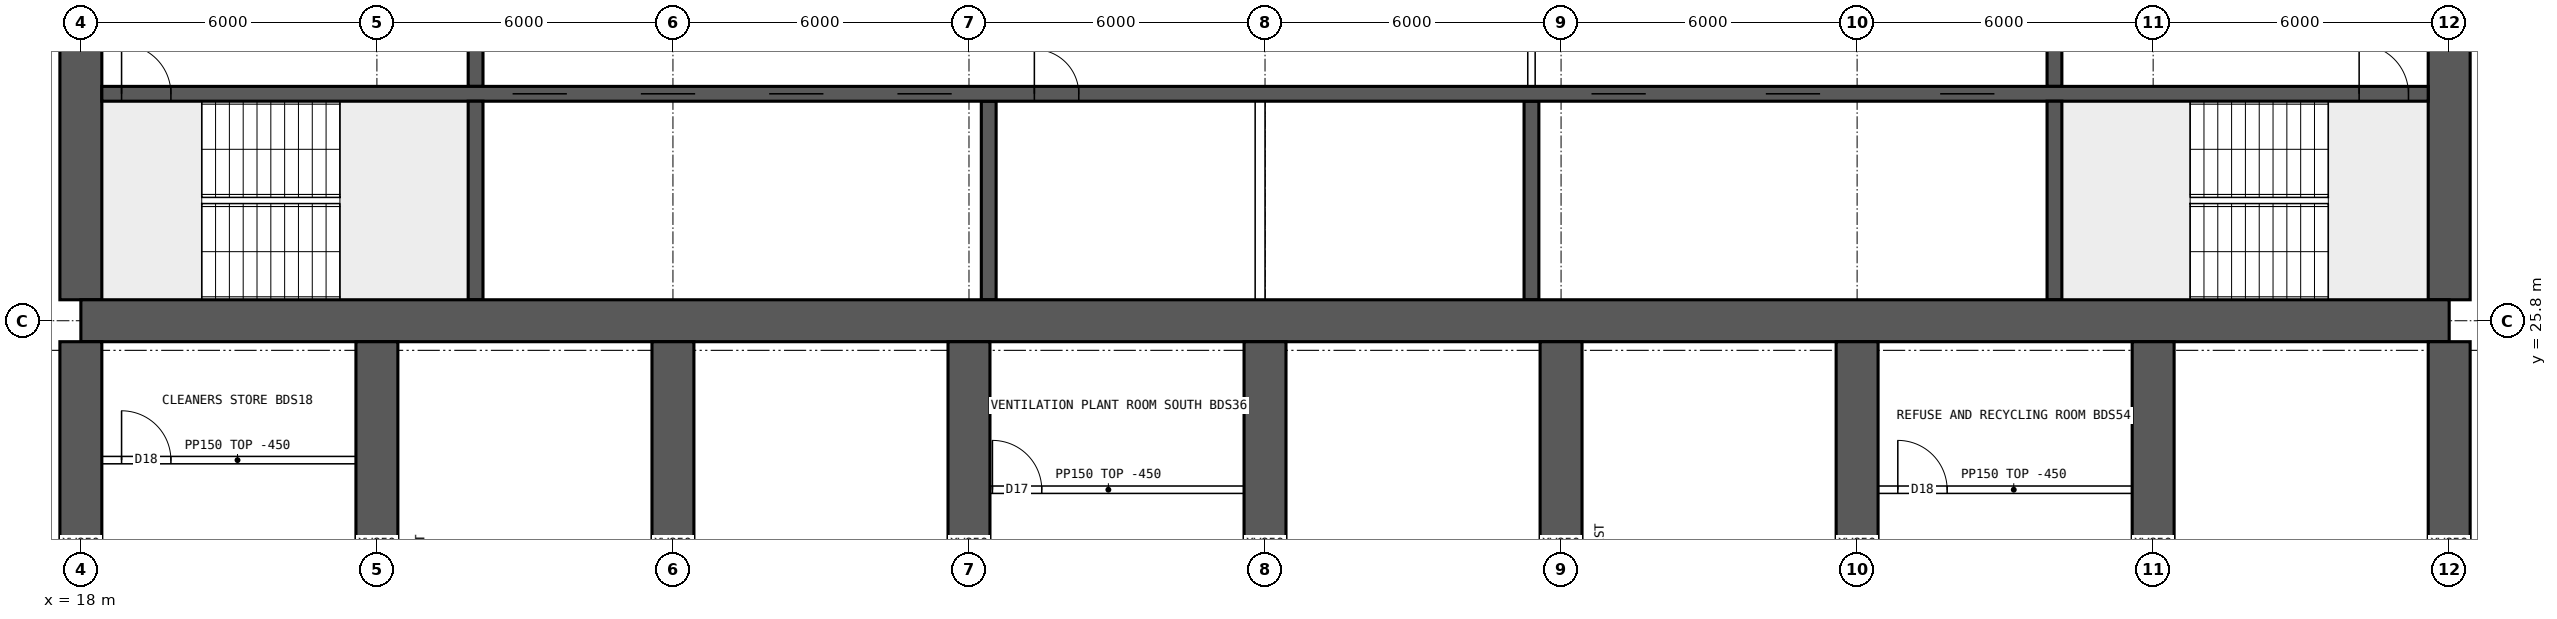
"""IFC4 building model, lengths in metres.
Left out: names, types, materials, properties, quantities, classifications, styles, units other than length and angle.
Written with IfcOpenShell. Run it as: python <this file> out.ifc"""

import sys

from ifc_helpers import new_model, si_unit, direction, frame, frame_2d, origin, place, context, subcontext, project, spatial, rectangle, extrude, element, fill, save


model = new_model("IFC4")
c1 = context("Model", 3, precision=1e-05, world=origin(), true_north=direction((0.0, 1.0)))
c2 = subcontext(c1, "Body", "Model", "MODEL_VIEW")
j1 = project(units=[si_unit("LENGTHUNIT", "METRE"), si_unit("PLANEANGLEUNIT", "RADIAN")], contexts=[c1])
p1 = place(None, origin())
s1 = spatial("IfcSite", under=j1, at=p1, CompositionType="ELEMENT")
p2 = place(p1, origin())
s2 = spatial("IfcBuilding", under=s1, at=p2, CompositionType="ELEMENT")
p3 = place(p2, frame((0.0, 0.0, 174.85)))
s3 = spatial("IfcBuildingStorey", under=s2, at=p3, CompositionType="ELEMENT", Elevation=174.85)
p4 = place(p3, frame((18.0, 25.8, 0.0), z_axis=(0.0, 0.0, 1.0), x_axis=(1.0, 0.0, 0.0)))
e1 = element("IfcWall", 1, at=p4, inside=s3, PredefinedType="SHEAR", context=c2, shape_type="SweptSolid", body=[
    extrude(rectangle(XDim=48.0, YDim=0.85, at=frame_2d((24.0, 0.0))), origin(), (0.0, 0.0, 1.0), 3.75),
])
p5 = place(p3, frame((18.0, 26.225, 0.0), z_axis=(0.0, 0.0, 1.0), x_axis=(0.0, 1.0, 0.0)))
e2 = element("IfcWall", 2, at=p5, inside=s3, PredefinedType="SHEAR", context=c2, shape_type="SweptSolid", body=[
    extrude(rectangle(XDim=11.55, YDim=0.85, at=frame_2d((5.775, 0.0))), origin(), (0.0, 0.0, 1.0), 3.75),
])
p6 = place(p5, frame((5.075, 0.0, 0.0)))
e3 = element("IfcOpeningElement", 3, at=p6, cuts=e2, PredefinedType="OPENING", context=c2, shape_type="SweptSolid", body=[
    extrude(rectangle(XDim=1.2, YDim=2.1, at=frame_2d((0.6, 1.05))), frame((0.0, 0.435, 0.0), z_axis=(0.0, -1.0, 0.0), x_axis=(1.0, 0.0, 0.0)), (0.0, 0.0, 1.0), 0.87),
])
p7 = place(p3, frame((66.0, 26.225, 0.0), z_axis=(0.0, 0.0, 1.0), x_axis=(0.0, 1.0, 0.0)))
e4 = element("IfcWall", 4, at=p7, inside=s3, PredefinedType="SHEAR", context=c2, shape_type="SweptSolid", body=[
    extrude(rectangle(XDim=11.55, YDim=0.85, at=frame_2d((5.775, 0.0))), origin(), (0.0, 0.0, 1.0), 3.75),
])
p8 = place(p7, frame((5.075, 0.0, 0.0)))
e5 = element("IfcOpeningElement", 5, at=p8, cuts=e4, PredefinedType="OPENING", context=c2, shape_type="SweptSolid", body=[
    extrude(rectangle(XDim=1.2, YDim=2.1, at=frame_2d((0.6, 1.05))), frame((0.0, 0.435, 0.0), z_axis=(0.0, -1.0, 0.0), x_axis=(1.0, 0.0, 0.0)), (0.0, 0.0, 1.0), 0.87),
])
p9 = place(p3, frame((18.425, 30.4, 0.0), z_axis=(0.0, 0.0, 1.0), x_axis=(1.0, 0.0, 0.0)))
e6 = element("IfcWall", 6, at=p9, inside=s3, PredefinedType="SHEAR", context=c2, shape_type="SweptSolid", body=[
    extrude(rectangle(XDim=47.15, YDim=0.3, at=frame_2d((23.575, 0.0))), origin(), (0.0, 0.0, 1.0), 3.75),
])
p10 = place(p9, frame((0.4, 0.0, 0.0)))
e7 = element("IfcOpeningElement", 7, at=p10, cuts=e6, PredefinedType="OPENING", context=c2, shape_type="SweptSolid", body=[
    extrude(rectangle(XDim=1.0, YDim=2.1, at=frame_2d((0.5, 1.05))), frame((0.0, 0.16, 0.0), z_axis=(0.0, -1.0, 0.0), x_axis=(1.0, 0.0, 0.0)), (0.0, 0.0, 1.0), 0.32),
])
p11 = place(p9, frame((45.75, 0.0, 0.0)))
e8 = element("IfcOpeningElement", 8, at=p11, cuts=e6, PredefinedType="OPENING", context=c2, shape_type="SweptSolid", body=[
    extrude(rectangle(XDim=1.0, YDim=2.1, at=frame_2d((0.5, 1.05))), frame((0.0, 0.16, 0.0), z_axis=(0.0, -1.0, 0.0), x_axis=(1.0, 0.0, 0.0)), (0.0, 0.0, 1.0), 0.32),
])
p12 = place(p9, frame((8.325, 0.0, 0.0)))
e9 = element("IfcOpeningElement", 9, at=p12, cuts=e6, PredefinedType="OPENING", context=c2, shape_type="SweptSolid", body=[
    extrude(rectangle(XDim=1.1, YDim=2.1, at=frame_2d((0.55, 1.05))), frame((0.0, 0.16, 0.0), z_axis=(0.0, -1.0, 0.0), x_axis=(1.0, 0.0, 0.0)), (0.0, 0.0, 1.0), 0.32),
])
p13 = place(p9, frame((10.925, 0.0, 0.0)))
e10 = element("IfcOpeningElement", 10, at=p13, cuts=e6, PredefinedType="OPENING", context=c2, shape_type="SweptSolid", body=[
    extrude(rectangle(XDim=1.1, YDim=2.1, at=frame_2d((0.55, 1.05))), frame((0.0, 0.16, 0.0), z_axis=(0.0, -1.0, 0.0), x_axis=(1.0, 0.0, 0.0)), (0.0, 0.0, 1.0), 0.32),
])
p14 = place(p9, frame((13.525, 0.0, 0.0)))
e11 = element("IfcOpeningElement", 11, at=p14, cuts=e6, PredefinedType="OPENING", context=c2, shape_type="SweptSolid", body=[
    extrude(rectangle(XDim=1.1, YDim=2.1, at=frame_2d((0.55, 1.05))), frame((0.0, 0.16, 0.0), z_axis=(0.0, -1.0, 0.0), x_axis=(1.0, 0.0, 0.0)), (0.0, 0.0, 1.0), 0.32),
])
p15 = place(p9, frame((16.125, 0.0, 0.0)))
e12 = element("IfcOpeningElement", 12, at=p15, cuts=e6, PredefinedType="OPENING", context=c2, shape_type="SweptSolid", body=[
    extrude(rectangle(XDim=1.1, YDim=2.1, at=frame_2d((0.55, 1.05))), frame((0.0, 0.16, 0.0), z_axis=(0.0, -1.0, 0.0), x_axis=(1.0, 0.0, 0.0)), (0.0, 0.0, 1.0), 0.32),
])
p16 = place(p9, frame((18.9, 0.0, 0.0)))
e13 = element("IfcOpeningElement", 13, at=p16, cuts=e6, PredefinedType="OPENING", context=c2, shape_type="SweptSolid", body=[
    extrude(rectangle(XDim=0.9, YDim=2.1, at=frame_2d((0.45, 1.05))), frame((0.0, 0.16, 0.0), z_axis=(0.0, -1.0, 0.0), x_axis=(1.0, 0.0, 0.0)), (0.0, 0.0, 1.0), 0.32),
])
p17 = place(p9, frame((30.192, 0.0, 0.0)))
e14 = element("IfcOpeningElement", 14, at=p17, cuts=e6, PredefinedType="OPENING", context=c2, shape_type="SweptSolid", body=[
    extrude(rectangle(XDim=1.1, YDim=2.1, at=frame_2d((0.55, 1.05))), frame((0.0, 0.16, 0.0), z_axis=(0.0, -1.0, 0.0), x_axis=(1.0, 0.0, 0.0)), (0.0, 0.0, 1.0), 0.32),
])
p18 = place(p9, frame((33.725, 0.0, 0.0)))
e15 = element("IfcOpeningElement", 15, at=p18, cuts=e6, PredefinedType="OPENING", context=c2, shape_type="SweptSolid", body=[
    extrude(rectangle(XDim=1.1, YDim=2.1, at=frame_2d((0.55, 1.05))), frame((0.0, 0.16, 0.0), z_axis=(0.0, -1.0, 0.0), x_axis=(1.0, 0.0, 0.0)), (0.0, 0.0, 1.0), 0.32),
])
p19 = place(p9, frame((37.258, 0.0, 0.0)))
e16 = element("IfcOpeningElement", 16, at=p19, cuts=e6, PredefinedType="OPENING", context=c2, shape_type="SweptSolid", body=[
    extrude(rectangle(XDim=1.1, YDim=2.1, at=frame_2d((0.55, 1.05))), frame((0.0, 0.16, 0.0), z_axis=(0.0, -1.0, 0.0), x_axis=(1.0, 0.0, 0.0)), (0.0, 0.0, 1.0), 0.32),
])
for number, where, z_axis, x_axis in (
    (17, (26.0, 26.225, 0.0), (0.0, 0.0, 1.0), (0.0, 1.0, 0.0)),
    (18, (58.0, 26.225, 0.0), (0.0, 0.0, 1.0), (0.0, 1.0, 0.0)),
):
    element("IfcWall", number, at=place(p3, frame(where, z_axis=z_axis, x_axis=x_axis)), inside=s3, PredefinedType="SHEAR", context=c2, shape_type="SweptSolid", body=[
        extrude(rectangle(XDim=4.025, YDim=0.3, at=frame_2d((2.012, 0.0))), origin(), (0.0, 0.0, 1.0), 3.75),
    ])
p20 = place(p3, frame((26.0, 30.55, 0.0), z_axis=(0.0, 0.0, 1.0), x_axis=(0.0, 1.0, 0.0)))
e19 = element("IfcWall", 19, at=p20, inside=s3, PredefinedType="SHEAR", context=c2, shape_type="SweptSolid", body=[
    extrude(rectangle(XDim=3.9, YDim=0.3, at=frame_2d((1.95, 0.0))), origin(), (0.0, 0.0, 1.0), 3.75),
])
p21 = place(p20, frame((1.4, 0.0, 0.0)))
e20 = element("IfcOpeningElement", 20, at=p21, cuts=e19, PredefinedType="OPENING", context=c2, shape_type="SweptSolid", body=[
    extrude(rectangle(XDim=1.2, YDim=2.1, at=frame_2d((0.6, 1.05))), frame((0.0, 0.16, 0.0), z_axis=(0.0, -1.0, 0.0), x_axis=(1.0, 0.0, 0.0)), (0.0, 0.0, 1.0), 0.32),
])
p22 = place(p3, frame((58.0, 30.55, 0.0), z_axis=(0.0, 0.0, 1.0), x_axis=(0.0, 1.0, 0.0)))
e21 = element("IfcWall", 21, at=p22, inside=s3, PredefinedType="SHEAR", context=c2, shape_type="SweptSolid", body=[
    extrude(rectangle(XDim=3.9, YDim=0.3, at=frame_2d((1.95, 0.0))), origin(), (0.0, 0.0, 1.0), 3.75),
])
p23 = place(p22, frame((1.4, 0.0, 0.0)))
e22 = element("IfcOpeningElement", 22, at=p23, cuts=e21, PredefinedType="OPENING", context=c2, shape_type="SweptSolid", body=[
    extrude(rectangle(XDim=1.2, YDim=2.1, at=frame_2d((0.6, 1.05))), frame((0.0, 0.16, 0.0), z_axis=(0.0, -1.0, 0.0), x_axis=(1.0, 0.0, 0.0)), (0.0, 0.0, 1.0), 0.32),
])
for number, where, z_axis, x_axis in (
    (23, (36.4, 26.225, 0.0), (0.0, 0.0, 1.0), (0.0, 1.0, 0.0)),
    (24, (47.4, 26.225, 0.0), (0.0, 0.0, 1.0), (0.0, 1.0, 0.0)),
):
    element("IfcWall", number, at=place(p3, frame(where, z_axis=z_axis, x_axis=x_axis)), inside=s3, PredefinedType="SHEAR", context=c2, shape_type="SweptSolid", body=[
        extrude(rectangle(XDim=4.025, YDim=0.3, at=frame_2d((2.012, 0.0))), origin(), (0.0, 0.0, 1.0), 3.75),
    ])
for number, where, z_axis, x_axis in (
    (25, (18.0, 17.2, 0.0), (0.0, 0.0, 1.0), (0.0, 1.0, 0.0)),
    (26, (24.0, 17.2, 0.0), (0.0, 0.0, 1.0), (0.0, 1.0, 0.0)),
    (27, (30.0, 17.2, 0.0), (0.0, 0.0, 1.0), (0.0, 1.0, 0.0)),
    (28, (36.0, 17.2, 0.0), (0.0, 0.0, 1.0), (0.0, 1.0, 0.0)),
    (29, (42.0, 17.2, 0.0), (0.0, 0.0, 1.0), (0.0, 1.0, 0.0)),
    (30, (48.0, 17.2, 0.0), (0.0, 0.0, 1.0), (0.0, 1.0, 0.0)),
    (31, (54.0, 17.2, 0.0), (0.0, 0.0, 1.0), (0.0, 1.0, 0.0)),
    (32, (60.0, 17.2, 0.0), (0.0, 0.0, 1.0), (0.0, 1.0, 0.0)),
    (33, (66.0, 17.2, 0.0), (0.0, 0.0, 1.0), (0.0, 1.0, 0.0)),
):
    element("IfcWall", number, at=place(p3, frame(where, z_axis=z_axis, x_axis=x_axis)), inside=s3, PredefinedType="SHEAR", context=c2, shape_type="SweptSolid", body=[
        extrude(rectangle(XDim=8.175, YDim=0.85, at=frame_2d((4.087, 0.0))), origin(), (0.0, 0.0, 1.0), 3.75),
    ])
p24 = place(p3, frame((47.4, 30.55, 0.0), z_axis=(0.0, 0.0, 1.0), x_axis=(0.0, 1.0, 0.0)))
e34 = element("IfcWall", 34, at=p24, inside=s3, PredefinedType="SOLIDWALL", context=c2, shape_type="SweptSolid", body=[
    extrude(rectangle(XDim=3.9, YDim=0.15, at=frame_2d((1.95, 0.0))), origin(), (0.0, 0.0, 1.0), 3.3),
])
p25 = place(p24, frame((1.15, 0.0, 0.0)))
e35 = element("IfcOpeningElement", 35, at=p25, cuts=e34, PredefinedType="OPENING", context=c2, shape_type="SweptSolid", body=[
    extrude(rectangle(XDim=1.6, YDim=2.1, at=frame_2d((0.8, 1.05))), frame((0.0, 0.085, 0.0), z_axis=(0.0, -1.0, 0.0), x_axis=(1.0, 0.0, 0.0)), (0.0, 0.0, 1.0), 0.17),
])
p26 = place(p3, frame((41.9, 26.225, 0.0), z_axis=(0.0, 0.0, 1.0), x_axis=(0.0, 1.0, 0.0)))
e36 = element("IfcWall", 36, at=p26, inside=s3, PredefinedType="SOLIDWALL", context=c2, shape_type="SweptSolid", body=[
    extrude(rectangle(XDim=4.025, YDim=0.2, at=frame_2d((2.012, 0.0))), origin(), (0.0, 0.0, 1.0), 3.3),
])
p27 = place(p3, frame((18.425, 22.975, 0.0), z_axis=(0.0, 0.0, 1.0), x_axis=(1.0, 0.0, 0.0)))
e37 = element("IfcWall", 37, at=p27, inside=s3, PredefinedType="PARTITIONING", context=c2, shape_type="SweptSolid", body=[
    extrude(rectangle(XDim=5.5, YDim=0.15, at=frame_2d((2.75, 0.0))), origin(), (0.0, 0.0, 1.0), 3.3),
])
p28 = place(p27, frame((0.4, 0.0, 0.0)))
e38 = element("IfcOpeningElement", 38, at=p28, cuts=e37, PredefinedType="OPENING", context=c2, shape_type="SweptSolid", body=[
    extrude(rectangle(XDim=1.0, YDim=2.1, at=frame_2d((0.5, 1.05))), frame((0.0, 0.085, 0.0), z_axis=(0.0, -1.0, 0.0), x_axis=(1.0, 0.0, 0.0)), (0.0, 0.0, 1.0), 0.17),
])
p29 = place(p3, frame((36.075, 22.375, 0.0), z_axis=(0.0, 0.0, 1.0), x_axis=(1.0, 0.0, 0.0)))
e39 = element("IfcWall", 39, at=p29, inside=s3, PredefinedType="PARTITIONING", context=c2, shape_type="SweptSolid", body=[
    extrude(rectangle(XDim=5.5, YDim=0.15, at=frame_2d((2.75, 0.0))), origin(), (0.0, 0.0, 1.0), 3.3),
])
p30 = place(p29, frame((0.4, 0.0, 0.0)))
e40 = element("IfcOpeningElement", 40, at=p30, cuts=e39, PredefinedType="OPENING", context=c2, shape_type="SweptSolid", body=[
    extrude(rectangle(XDim=1.0, YDim=2.1, at=frame_2d((0.5, 1.05))), frame((0.0, 0.085, 0.0), z_axis=(0.0, -1.0, 0.0), x_axis=(1.0, 0.0, 0.0)), (0.0, 0.0, 1.0), 0.17),
])
p31 = place(p3, frame((54.425, 22.375, 0.0), z_axis=(0.0, 0.0, 1.0), x_axis=(1.0, 0.0, 0.0)))
e41 = element("IfcWall", 41, at=p31, inside=s3, PredefinedType="PARTITIONING", context=c2, shape_type="SweptSolid", body=[
    extrude(rectangle(XDim=5.5, YDim=0.15, at=frame_2d((2.75, 0.0))), origin(), (0.0, 0.0, 1.0), 3.3),
])
p32 = place(p31, frame((0.4, 0.0, 0.0)))
e42 = element("IfcOpeningElement", 42, at=p32, cuts=e41, PredefinedType="OPENING", context=c2, shape_type="SweptSolid", body=[
    extrude(rectangle(XDim=1.0, YDim=2.1, at=frame_2d((0.5, 1.05))), frame((0.0, 0.085, 0.0), z_axis=(0.0, -1.0, 0.0), x_axis=(1.0, 0.0, 0.0)), (0.0, 0.0, 1.0), 0.17),
])
p33 = place(p10, origin())
e43 = element("IfcDoor", 43, at=p33, inside=s3, OperationType="SINGLE_SWING_LEFT", PredefinedType="DOOR", context=c2, shape_type="SweptSolid", body=[
    extrude(rectangle(XDim=1.0, YDim=2.1, at=frame_2d((0.5, 1.05))), frame((0.0, 0.025, 0.0), z_axis=(0.0, -1.0, 0.0), x_axis=(1.0, 0.0, 0.0)), (0.0, 0.0, 1.0), 0.05),
])
fill(e7, e43)
p34 = place(p11, origin())
e44 = element("IfcDoor", 44, at=p34, inside=s3, OperationType="SINGLE_SWING_LEFT", PredefinedType="DOOR", context=c2, shape_type="SweptSolid", body=[
    extrude(rectangle(XDim=1.0, YDim=2.1, at=frame_2d((0.5, 1.05))), frame((0.0, 0.025, 0.0), z_axis=(0.0, -1.0, 0.0), x_axis=(1.0, 0.0, 0.0)), (0.0, 0.0, 1.0), 0.05),
])
fill(e8, e44)
p35 = place(p12, origin())
e45 = element("IfcDoor", 45, at=p35, inside=s3, OperationType="DOUBLE_DOOR_SLIDING", PredefinedType="DOOR", context=c2, shape_type="SweptSolid", body=[
    extrude(rectangle(XDim=1.1, YDim=2.1, at=frame_2d((0.55, 1.05))), frame((0.0, 0.025, 0.0), z_axis=(0.0, -1.0, 0.0), x_axis=(1.0, 0.0, 0.0)), (0.0, 0.0, 1.0), 0.05),
])
fill(e9, e45)
p36 = place(p13, origin())
e46 = element("IfcDoor", 46, at=p36, inside=s3, OperationType="DOUBLE_DOOR_SLIDING", PredefinedType="DOOR", context=c2, shape_type="SweptSolid", body=[
    extrude(rectangle(XDim=1.1, YDim=2.1, at=frame_2d((0.55, 1.05))), frame((0.0, 0.025, 0.0), z_axis=(0.0, -1.0, 0.0), x_axis=(1.0, 0.0, 0.0)), (0.0, 0.0, 1.0), 0.05),
])
fill(e10, e46)
p37 = place(p14, origin())
e47 = element("IfcDoor", 47, at=p37, inside=s3, OperationType="DOUBLE_DOOR_SLIDING", PredefinedType="DOOR", context=c2, shape_type="SweptSolid", body=[
    extrude(rectangle(XDim=1.1, YDim=2.1, at=frame_2d((0.55, 1.05))), frame((0.0, 0.025, 0.0), z_axis=(0.0, -1.0, 0.0), x_axis=(1.0, 0.0, 0.0)), (0.0, 0.0, 1.0), 0.05),
])
fill(e11, e47)
p38 = place(p15, origin())
e48 = element("IfcDoor", 48, at=p38, inside=s3, OperationType="DOUBLE_DOOR_SLIDING", PredefinedType="DOOR", context=c2, shape_type="SweptSolid", body=[
    extrude(rectangle(XDim=1.1, YDim=2.1, at=frame_2d((0.55, 1.05))), frame((0.0, 0.025, 0.0), z_axis=(0.0, -1.0, 0.0), x_axis=(1.0, 0.0, 0.0)), (0.0, 0.0, 1.0), 0.05),
])
fill(e12, e48)
p39 = place(p16, origin())
e49 = element("IfcDoor", 49, at=p39, inside=s3, OperationType="SINGLE_SWING_LEFT", PredefinedType="DOOR", context=c2, shape_type="SweptSolid", body=[
    extrude(rectangle(XDim=0.9, YDim=2.1, at=frame_2d((0.45, 1.05))), frame((0.0, 0.025, 0.0), z_axis=(0.0, -1.0, 0.0), x_axis=(1.0, 0.0, 0.0)), (0.0, 0.0, 1.0), 0.05),
])
fill(e13, e49)
p40 = place(p17, origin())
e50 = element("IfcDoor", 50, at=p40, inside=s3, OperationType="DOUBLE_DOOR_SLIDING", PredefinedType="DOOR", context=c2, shape_type="SweptSolid", body=[
    extrude(rectangle(XDim=1.1, YDim=2.1, at=frame_2d((0.55, 1.05))), frame((0.0, 0.025, 0.0), z_axis=(0.0, -1.0, 0.0), x_axis=(1.0, 0.0, 0.0)), (0.0, 0.0, 1.0), 0.05),
])
fill(e14, e50)
p41 = place(p18, origin())
e51 = element("IfcDoor", 51, at=p41, inside=s3, OperationType="DOUBLE_DOOR_SLIDING", PredefinedType="DOOR", context=c2, shape_type="SweptSolid", body=[
    extrude(rectangle(XDim=1.1, YDim=2.1, at=frame_2d((0.55, 1.05))), frame((0.0, 0.025, 0.0), z_axis=(0.0, -1.0, 0.0), x_axis=(1.0, 0.0, 0.0)), (0.0, 0.0, 1.0), 0.05),
])
fill(e15, e51)
p42 = place(p19, origin())
e52 = element("IfcDoor", 52, at=p42, inside=s3, OperationType="DOUBLE_DOOR_SLIDING", PredefinedType="DOOR", context=c2, shape_type="SweptSolid", body=[
    extrude(rectangle(XDim=1.1, YDim=2.1, at=frame_2d((0.55, 1.05))), frame((0.0, 0.025, 0.0), z_axis=(0.0, -1.0, 0.0), x_axis=(1.0, 0.0, 0.0)), (0.0, 0.0, 1.0), 0.05),
])
fill(e16, e52)
p43 = place(p28, origin())
e53 = element("IfcDoor", 53, at=p43, inside=s3, OperationType="SINGLE_SWING_LEFT", PredefinedType="DOOR", context=c2, shape_type="SweptSolid", body=[
    extrude(rectangle(XDim=1.0, YDim=2.1, at=frame_2d((0.5, 1.05))), frame((0.0, 0.025, 0.0), z_axis=(0.0, -1.0, 0.0), x_axis=(1.0, 0.0, 0.0)), (0.0, 0.0, 1.0), 0.05),
])
fill(e38, e53)
p44 = place(p30, origin())
e54 = element("IfcDoor", 54, at=p44, inside=s3, OperationType="SINGLE_SWING_LEFT", PredefinedType="DOOR", context=c2, shape_type="SweptSolid", body=[
    extrude(rectangle(XDim=1.0, YDim=2.1, at=frame_2d((0.5, 1.05))), frame((0.0, 0.025, 0.0), z_axis=(0.0, -1.0, 0.0), x_axis=(1.0, 0.0, 0.0)), (0.0, 0.0, 1.0), 0.05),
])
fill(e40, e54)
p45 = place(p32, origin())
e55 = element("IfcDoor", 55, at=p45, inside=s3, OperationType="SINGLE_SWING_LEFT", PredefinedType="DOOR", context=c2, shape_type="SweptSolid", body=[
    extrude(rectangle(XDim=1.0, YDim=2.1, at=frame_2d((0.5, 1.05))), frame((0.0, 0.025, 0.0), z_axis=(0.0, -1.0, 0.0), x_axis=(1.0, 0.0, 0.0)), (0.0, 0.0, 1.0), 0.05),
])
fill(e42, e55)
save(model, sys.argv[1])
